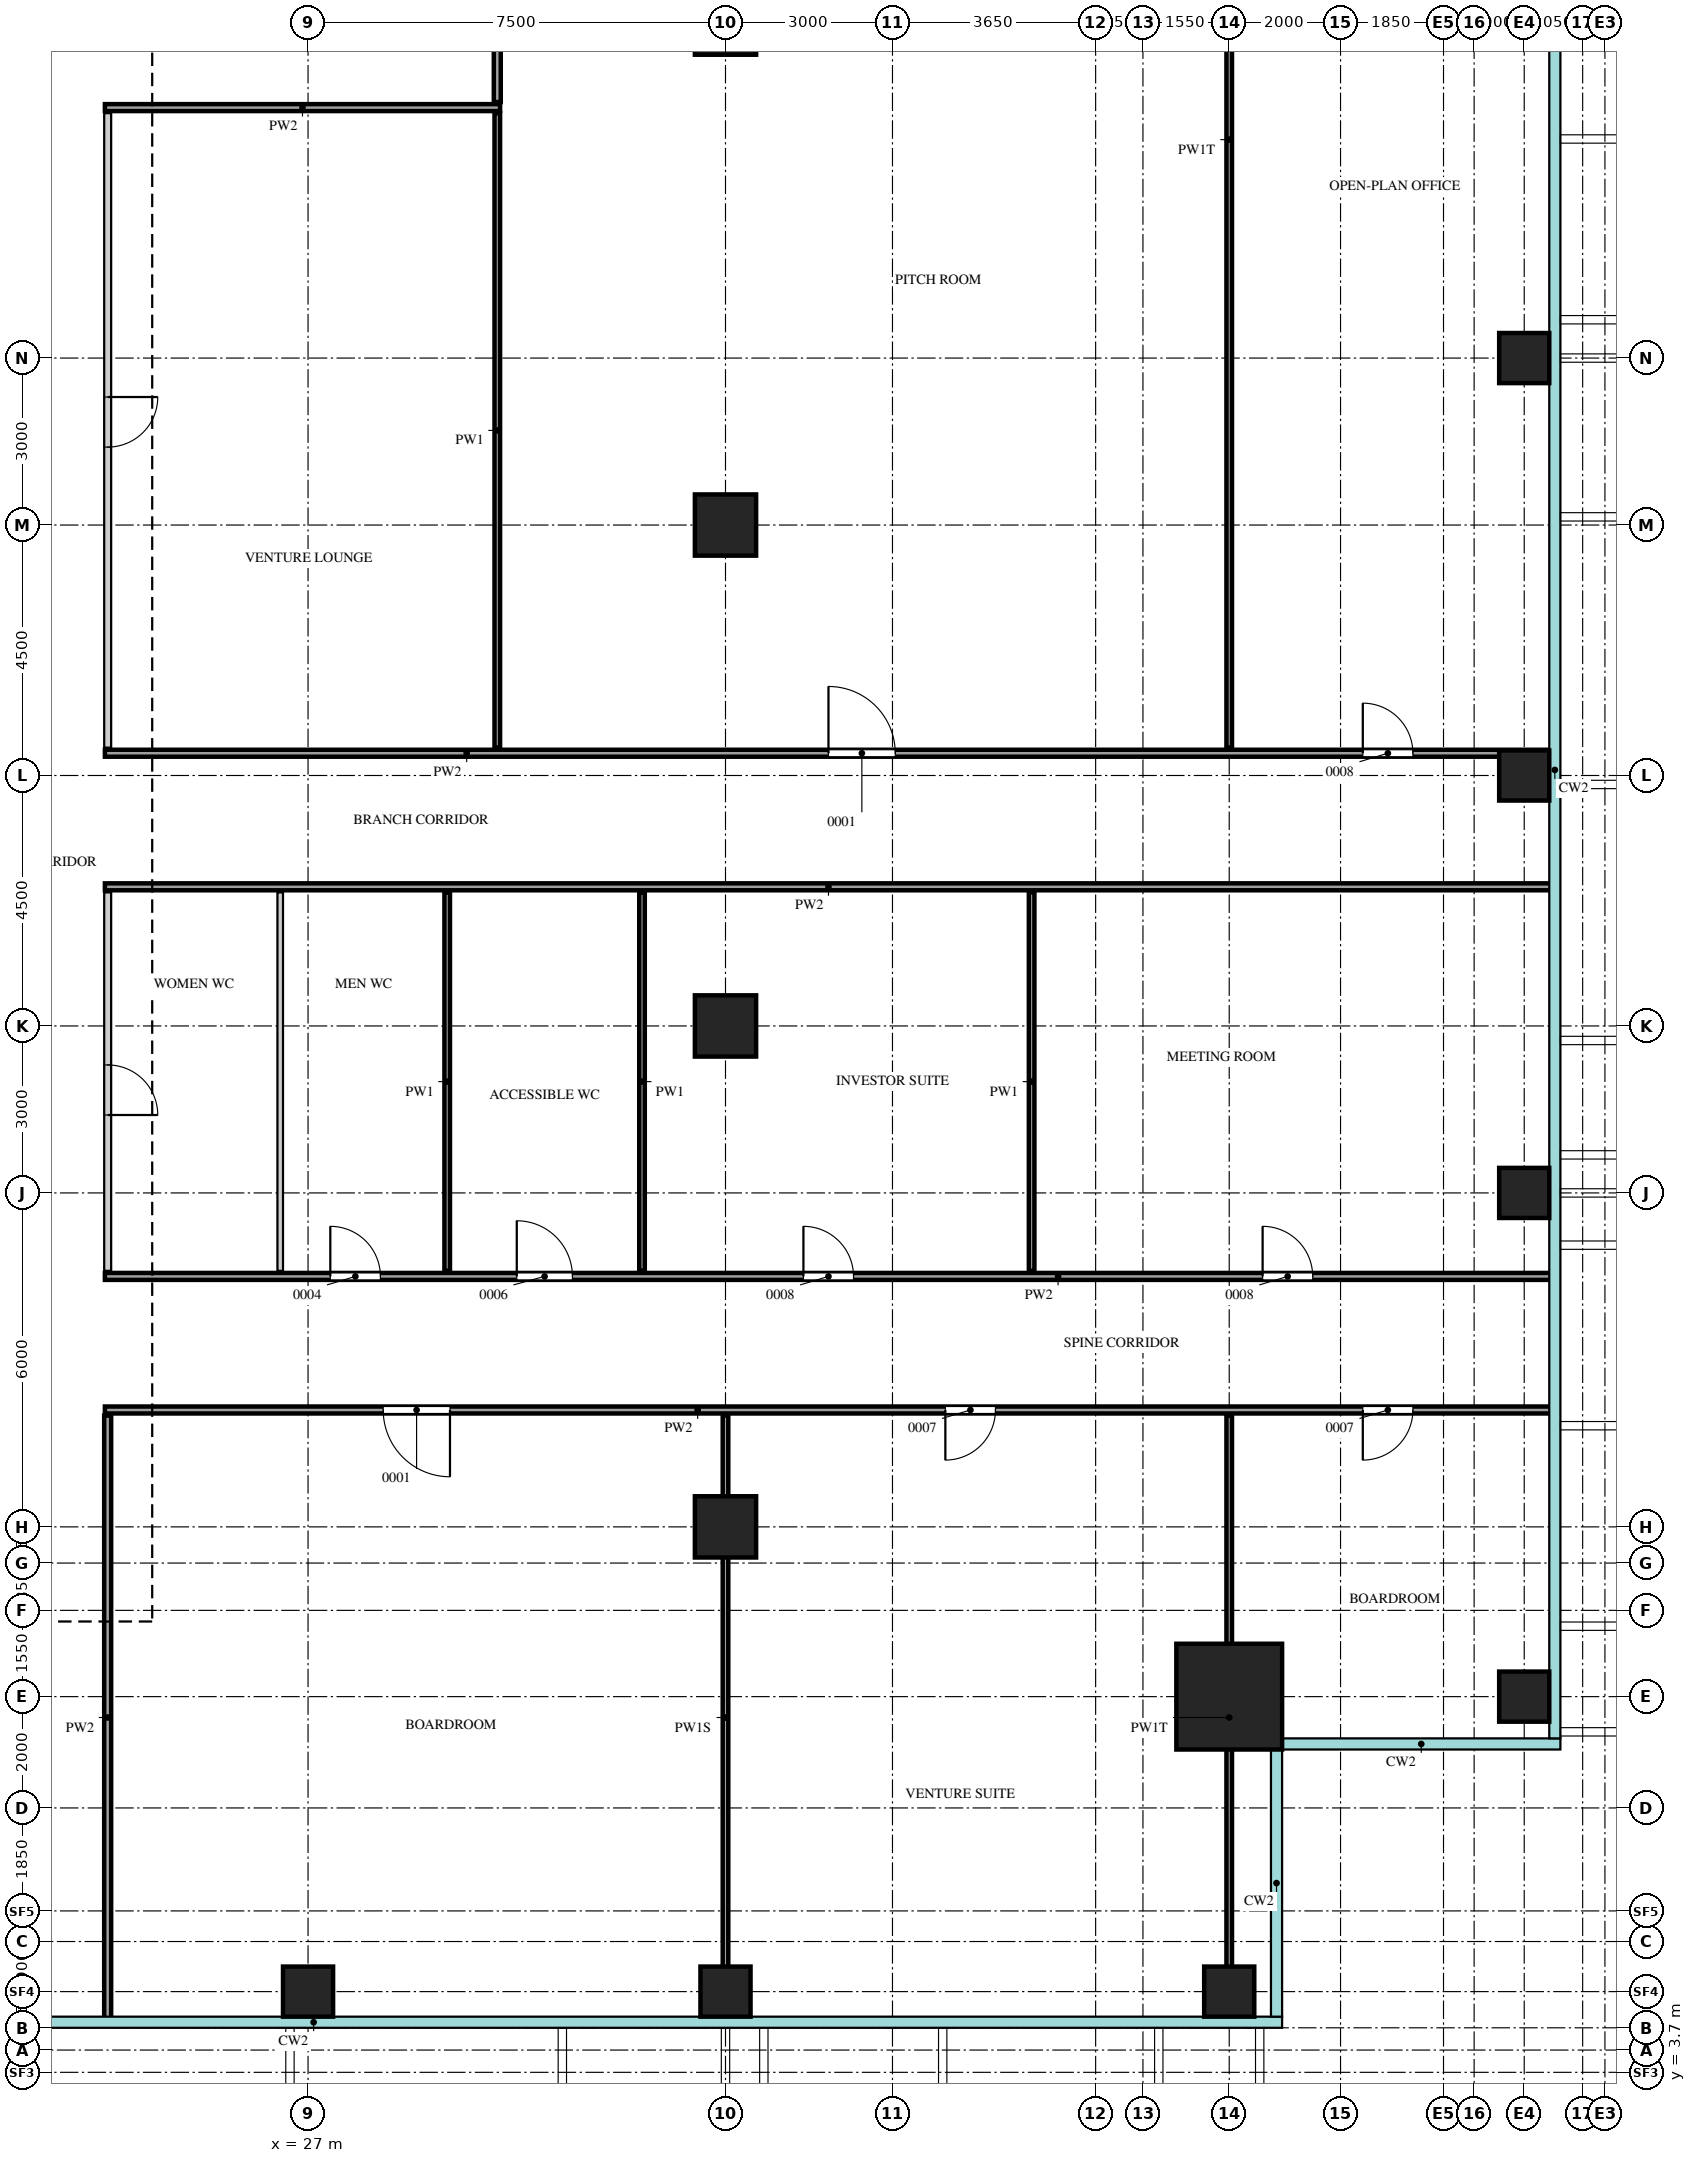
"""IFC4 building model, lengths in metres.
Left out: names, types, materials, properties, quantities, classifications, styles, units other than length and angle.
Written with IfcOpenShell. Run it as: python <this file> out.ifc"""

import sys

from ifc_helpers import new_model, si_unit, direction, frame, frame_2d, origin, origin_2d, place, context, subcontext, project, spatial, rectangle, extrude, source, transform, mapped, element, fill, save


model = new_model("IFC4")
c1 = context("Model", 3, precision=1e-05, world=origin(), true_north=direction((0.0, 1.0)))
c2 = subcontext(c1, "Body", "Model", "MODEL_VIEW")
j1 = project(units=[si_unit("LENGTHUNIT", "METRE"), si_unit("PLANEANGLEUNIT", "RADIAN")], contexts=[c1])
p1 = place(None, origin())
s1 = spatial("IfcSite", under=j1, at=p1, CompositionType="ELEMENT")
p2 = place(p1, origin())
s2 = spatial("IfcBuilding", under=s1, at=p2, CompositionType="ELEMENT")
p3 = place(p2, frame((0.0, 0.0, 234.2)))
s3 = spatial("IfcBuildingStorey", under=s2, at=p3, CompositionType="ELEMENT", Elevation=234.2)
m1 = source(origin(), c2, "Body", "SweptSolid", [
    extrude(rectangle(XDim=1.9, YDim=1.9, at=origin_2d()), origin(), (0.0, 0.0, 1.0), 4.0),
])
p4 = place(p3, frame((43.55, 10.45, 0.0), z_axis=(0.0, 0.0, 1.0), x_axis=(1.0, 0.0, 0.0)))
e1 = element("IfcColumn", 1, at=p4, inside=s3, PredefinedType="COLUMN", context=c2, shape_type="MappedRepresentation", body=[
    mapped(m1, transform((0.0, 0.0, 0.0))),
])
m2 = source(origin(), c2, "Body", "SweptSolid", [
    extrude(rectangle(XDim=0.9, YDim=0.9, at=origin_2d()), origin(), (0.0, 0.0, 1.0), 3.75),
])
for number, where, z_axis, x_axis in (
    (2, (27.0, 5.15, 0.0), (0.0, 0.0, 1.0), (1.0, 0.0, 0.0)),
    (3, (34.5, 5.15, 0.0), (0.0, 0.0, 1.0), (1.0, 0.0, 0.0)),
    (4, (43.55, 5.15, 0.0), (0.0, 0.0, 1.0), (1.0, 0.0, 0.0)),
    (5, (48.85, 10.45, 0.0), (0.0, 0.0, 1.0), (1.0, 0.0, 0.0)),
    (6, (48.85, 19.5, 0.0), (0.0, 0.0, 1.0), (1.0, 0.0, 0.0)),
    (7, (48.85, 27.0, 0.0), (0.0, 0.0, 1.0), (1.0, 0.0, 0.0)),
    (8, (48.85, 34.5, 0.0), (0.0, 0.0, 1.0), (1.0, 0.0, 0.0)),
):
    element("IfcColumn", number, at=place(p3, frame(where, z_axis=z_axis, x_axis=x_axis)), inside=s3, PredefinedType="COLUMN", context=c2, shape_type="MappedRepresentation", body=[
        mapped(m2, transform((0.0, 0.0, 0.0))),
    ])
m3 = source(origin(), c2, "Body", "SweptSolid", [
    extrude(rectangle(XDim=1.1, YDim=1.1, at=origin_2d()), origin(), (0.0, 0.0, 1.0), 3.75),
])
for number, where, z_axis, x_axis in (
    (9, (34.5, 13.5, 0.0), (0.0, 0.0, 1.0), (1.0, 0.0, 0.0)),
    (10, (34.5, 22.5, 0.0), (0.0, 0.0, 1.0), (1.0, 0.0, 0.0)),
    (11, (34.5, 31.5, 0.0), (0.0, 0.0, 1.0), (1.0, 0.0, 0.0)),
    (12, (34.5, 40.5, 0.0), (0.0, 0.0, 1.0), (1.0, 0.0, 0.0)),
):
    element("IfcColumn", number, at=place(p3, frame(where, z_axis=z_axis, x_axis=x_axis)), inside=s3, PredefinedType="COLUMN", context=c2, shape_type="MappedRepresentation", body=[
        mapped(m3, transform((0.0, 0.0, 0.0))),
    ])
m4 = source(origin(), c2, "Body", "SweptSolid", [
    extrude(rectangle(XDim=10.85, YDim=0.125, at=frame_2d((5.425, 0.0))), origin(), (0.0, 0.0, 1.0), 3.8),
])
p5 = place(p3, frame((23.4, 4.65, 0.0), z_axis=(0.0, 0.0, 1.0), x_axis=(0.0, 1.0, 0.0)))
e13 = element("IfcWall", 13, at=p5, inside=s3, PredefinedType="PARTITIONING", context=c2, shape_type="MappedRepresentation", body=[
    mapped(m4, transform((0.0, 0.0, 0.0))),
])
m5 = source(origin(), c2, "Body", "SweptSolid", [
    extrude(rectangle(XDim=10.85, YDim=0.1, at=frame_2d((5.425, 0.0))), origin(), (0.0, 0.0, 1.0), 3.35),
])
p6 = place(p3, frame((34.5, 4.65, 0.0), z_axis=(0.0, 0.0, 1.0), x_axis=(0.0, 1.0, 0.0)))
e14 = element("IfcWall", 14, at=p6, inside=s3, PredefinedType="PARTITIONING", context=c2, shape_type="MappedRepresentation", body=[
    mapped(m5, transform((0.0, 0.0, 0.0))),
])
m6 = source(origin(), c2, "Body", "SweptSolid", [
    extrude(rectangle(XDim=10.85, YDim=0.1, at=frame_2d((5.425, 0.0))), origin(), (0.0, 0.0, 1.0), 3.3),
])
p7 = place(p3, frame((43.55, 4.65, 0.0), z_axis=(0.0, 0.0, 1.0), x_axis=(0.0, 1.0, 0.0)))
e15 = element("IfcWall", 15, at=p7, inside=s3, PredefinedType="PARTITIONING", context=c2, shape_type="MappedRepresentation", body=[
    mapped(m6, transform((0.0, 0.0, 0.0))),
])
m7 = source(origin(), c2, "Body", "SweptSolid", [
    extrude(rectangle(XDim=26.0, YDim=0.125, at=frame_2d((13.0, 0.0))), origin(), (0.0, 0.0, 1.0), 3.8),
])
p8 = place(p3, frame((23.35, 15.6, 0.0), z_axis=(0.0, 0.0, 1.0), x_axis=(1.0, 0.0, 0.0)))
e16 = element("IfcWall", 16, at=p8, inside=s3, PredefinedType="PARTITIONING", context=c2, shape_type="MappedRepresentation", body=[
    mapped(m7, transform((0.0, 0.0, 0.0))),
])
m8 = source(origin(), c2, "Body", "SweptSolid", [
    extrude(rectangle(XDim=1.2, YDim=2.1, at=frame_2d((0.6, 1.05))), frame((0.0, 0.073, 0.0), z_axis=(0.0, -1.0, 0.0), x_axis=(1.0, 0.0, 0.0)), (0.0, 0.0, 1.0), 0.145),
])
p9 = place(p8, frame((5.0, 0.0, 0.0)))
e17 = element("IfcOpeningElement", 17, at=p9, cuts=e16, PredefinedType="OPENING", context=c2, shape_type="MappedRepresentation", body=[
    mapped(m8, transform((0.0, 0.0, 0.0))),
])
m9 = source(origin(), c2, "Body", "SweptSolid", [
    extrude(rectangle(XDim=0.9, YDim=2.1, at=frame_2d((0.45, 1.05))), frame((0.0, 0.073, 0.0), z_axis=(0.0, -1.0, 0.0), x_axis=(1.0, 0.0, 0.0)), (0.0, 0.0, 1.0), 0.145),
])
p10 = place(p8, frame((15.1, 0.0, 0.0)))
e18 = element("IfcOpeningElement", 18, at=p10, cuts=e16, PredefinedType="OPENING", context=c2, shape_type="MappedRepresentation", body=[
    mapped(m9, transform((0.0, 0.0, 0.0))),
])
p11 = place(p8, frame((22.6, 0.0, 0.0)))
e19 = element("IfcOpeningElement", 19, at=p11, cuts=e16, PredefinedType="OPENING", context=c2, shape_type="MappedRepresentation", body=[
    mapped(m9, transform((0.0, 0.0, 0.0))),
])
p12 = place(p3, frame((23.35, 18.0, 0.0), z_axis=(0.0, 0.0, 1.0), x_axis=(1.0, 0.0, 0.0)))
e20 = element("IfcWall", 20, at=p12, inside=s3, PredefinedType="PARTITIONING", context=c2, shape_type="MappedRepresentation", body=[
    mapped(m7, transform((0.0, 0.0, 0.0))),
])
p13 = place(p12, frame((4.05, 0.0, 0.0)))
e21 = element("IfcOpeningElement", 21, at=p13, cuts=e20, PredefinedType="OPENING", context=c2, shape_type="MappedRepresentation", body=[
    mapped(m9, transform((0.0, 0.0, 0.0))),
])
m10 = source(origin(), c2, "Body", "SweptSolid", [
    extrude(rectangle(XDim=1.0, YDim=2.1, at=frame_2d((0.5, 1.05))), frame((0.0, 0.073, 0.0), z_axis=(0.0, -1.0, 0.0), x_axis=(1.0, 0.0, 0.0)), (0.0, 0.0, 1.0), 0.145),
])
p14 = place(p12, frame((7.4, 0.0, 0.0)))
e22 = element("IfcOpeningElement", 22, at=p14, cuts=e20, PredefinedType="OPENING", context=c2, shape_type="MappedRepresentation", body=[
    mapped(m10, transform((0.0, 0.0, 0.0))),
])
p15 = place(p12, frame((12.55, 0.0, 0.0)))
e23 = element("IfcOpeningElement", 23, at=p15, cuts=e20, PredefinedType="OPENING", context=c2, shape_type="MappedRepresentation", body=[
    mapped(m9, transform((0.0, 0.0, 0.0))),
])
p16 = place(p12, frame((20.8, 0.0, 0.0)))
e24 = element("IfcOpeningElement", 24, at=p16, cuts=e20, PredefinedType="OPENING", context=c2, shape_type="MappedRepresentation", body=[
    mapped(m9, transform((0.0, 0.0, 0.0))),
])
m11 = source(origin(), c2, "Body", "SweptSolid", [
    extrude(rectangle(XDim=6.8, YDim=0.125, at=frame_2d((3.4, 0.0))), origin(), (0.0, 0.0, 1.0), 3.8),
])
p17 = place(p3, frame((23.4, 18.1, 0.0), z_axis=(0.0, 0.0, 1.0), x_axis=(0.0, 1.0, 0.0)))
e25 = element("IfcWall", 25, at=p17, inside=s3, PredefinedType="PARTITIONING", context=c2, shape_type="MappedRepresentation", body=[
    mapped(m11, transform((0.0, 0.0, 0.0))),
])
p18 = place(p17, frame((2.8, 0.0, 0.0)))
e26 = element("IfcOpeningElement", 26, at=p18, cuts=e25, PredefinedType="OPENING", context=c2, shape_type="MappedRepresentation", body=[
    mapped(m9, transform((0.0, 0.0, 0.0))),
])
m12 = source(origin(), c2, "Body", "SweptSolid", [
    extrude(rectangle(XDim=6.8, YDim=0.1, at=frame_2d((3.4, 0.0))), origin(), (0.0, 0.0, 1.0), 3.8),
])
for number, where, z_axis, x_axis in (
    (27, (26.5, 18.1, 0.0), (0.0, 0.0, 1.0), (0.0, 1.0, 0.0)),
    (28, (29.5, 18.1, 0.0), (0.0, 0.0, 1.0), (0.0, 1.0, 0.0)),
    (29, (33.0, 18.1, 0.0), (0.0, 0.0, 1.0), (0.0, 1.0, 0.0)),
    (30, (40.0, 18.1, 0.0), (0.0, 0.0, 1.0), (0.0, 1.0, 0.0)),
):
    element("IfcWall", number, at=place(p3, frame(where, z_axis=z_axis, x_axis=x_axis)), inside=s3, PredefinedType="PARTITIONING", context=c2, shape_type="MappedRepresentation", body=[
        mapped(m12, transform((0.0, 0.0, 0.0))),
    ])
p19 = place(p3, frame((23.35, 25.0, 0.0), z_axis=(0.0, 0.0, 1.0), x_axis=(1.0, 0.0, 0.0)))
e31 = element("IfcWall", 31, at=p19, inside=s3, PredefinedType="PARTITIONING", context=c2, shape_type="MappedRepresentation", body=[
    mapped(m7, transform((0.0, 0.0, 0.0))),
])
p20 = place(p3, frame((23.35, 27.4, 0.0), z_axis=(0.0, 0.0, 1.0), x_axis=(1.0, 0.0, 0.0)))
e32 = element("IfcWall", 32, at=p20, inside=s3, PredefinedType="PARTITIONING", context=c2, shape_type="MappedRepresentation", body=[
    mapped(m7, transform((0.0, 0.0, 0.0))),
])
p21 = place(p20, frame((13.0, 0.0, 0.0)))
e33 = element("IfcOpeningElement", 33, at=p21, cuts=e32, PredefinedType="OPENING", context=c2, shape_type="MappedRepresentation", body=[
    mapped(m8, transform((0.0, 0.0, 0.0))),
])
p22 = place(p20, frame((22.6, 0.0, 0.0)))
e34 = element("IfcOpeningElement", 34, at=p22, cuts=e32, PredefinedType="OPENING", context=c2, shape_type="MappedRepresentation", body=[
    mapped(m9, transform((0.0, 0.0, 0.0))),
])
m13 = source(origin(), c2, "Body", "SweptSolid", [
    extrude(rectangle(XDim=11.4, YDim=0.125, at=frame_2d((5.7, 0.0))), origin(), (0.0, 0.0, 1.0), 3.8),
])
p23 = place(p3, frame((23.4, 27.5, 0.0), z_axis=(0.0, 0.0, 1.0), x_axis=(0.0, 1.0, 0.0)))
e35 = element("IfcWall", 35, at=p23, inside=s3, PredefinedType="PARTITIONING", context=c2, shape_type="MappedRepresentation", body=[
    mapped(m13, transform((0.0, 0.0, 0.0))),
])
p24 = place(p23, frame((5.4, 0.0, 0.0)))
e36 = element("IfcOpeningElement", 36, at=p24, cuts=e35, PredefinedType="OPENING", context=c2, shape_type="MappedRepresentation", body=[
    mapped(m9, transform((0.0, 0.0, 0.0))),
])
m14 = source(origin(), c2, "Body", "SweptSolid", [
    extrude(rectangle(XDim=11.4, YDim=0.1, at=frame_2d((5.7, 0.0))), origin(), (0.0, 0.0, 1.0), 3.8),
])
p25 = place(p3, frame((30.4, 27.5, 0.0), z_axis=(0.0, 0.0, 1.0), x_axis=(0.0, 1.0, 0.0)))
e37 = element("IfcWall", 37, at=p25, inside=s3, PredefinedType="PARTITIONING", context=c2, shape_type="MappedRepresentation", body=[
    mapped(m14, transform((0.0, 0.0, 0.0))),
])
m15 = source(origin(), c2, "Body", "SweptSolid", [
    extrude(rectangle(XDim=21.85, YDim=0.1, at=frame_2d((10.925, 0.0))), origin(), (0.0, 0.0, 1.0), 3.3),
])
p26 = place(p3, frame((43.55, 27.5, 0.0), z_axis=(0.0, 0.0, 1.0), x_axis=(0.0, 1.0, 0.0)))
e38 = element("IfcWall", 38, at=p26, inside=s3, PredefinedType="PARTITIONING", context=c2, shape_type="MappedRepresentation", body=[
    mapped(m15, transform((0.0, 0.0, 0.0))),
])
m16 = source(origin(), c2, "Body", "SweptSolid", [
    extrude(rectangle(XDim=7.1, YDim=0.125, at=frame_2d((3.55, 0.0))), origin(), (0.0, 0.0, 1.0), 3.8),
])
p27 = place(p3, frame((23.35, 39.0, 0.0), z_axis=(0.0, 0.0, 1.0), x_axis=(1.0, 0.0, 0.0)))
e39 = element("IfcWall", 39, at=p27, inside=s3, PredefinedType="PARTITIONING", context=c2, shape_type="MappedRepresentation", body=[
    mapped(m16, transform((0.0, 0.0, 0.0))),
])
m17 = source(origin(), c2, "Body", "SweptSolid", [
    extrude(rectangle(XDim=6.6, YDim=0.125, at=frame_2d((3.3, 0.0))), origin(), (0.0, 0.0, 1.0), 3.8),
])
p28 = place(p3, frame((30.4, 39.1, 0.0), z_axis=(0.0, 0.0, 1.0), x_axis=(0.0, 1.0, 0.0)))
e40 = element("IfcWall", 40, at=p28, inside=s3, PredefinedType="PARTITIONING", context=c2, shape_type="MappedRepresentation", body=[
    mapped(m17, transform((0.0, 0.0, 0.0))),
])
m18 = source(origin(), c2, "Body", "SweptSolid", [
    extrude(rectangle(XDim=1.2, YDim=2.1, at=frame_2d((0.6, 1.05))), frame((0.0, 0.025, 0.0), z_axis=(0.0, -1.0, 0.0), x_axis=(1.0, 0.0, 0.0)), (0.0, 0.0, 1.0), 0.05),
])
p29 = place(p9, origin())
e41 = element("IfcDoor", 41, at=p29, inside=s3, OperationType="SINGLE_SWING_RIGHT", PredefinedType="DOOR", context=c2, shape_type="MappedRepresentation", body=[
    mapped(m18, transform((0.0, 0.0, 0.0))),
])
fill(e17, e41)
m19 = source(origin(), c2, "Body", "SweptSolid", [
    extrude(rectangle(XDim=0.9, YDim=2.1, at=frame_2d((0.45, 1.05))), frame((0.0, 0.025, 0.0), z_axis=(0.0, -1.0, 0.0), x_axis=(1.0, 0.0, 0.0)), (0.0, 0.0, 1.0), 0.05),
])
p30 = place(p10, origin())
e42 = element("IfcDoor", 42, at=p30, inside=s3, OperationType="SINGLE_SWING_LEFT", PredefinedType="DOOR", context=c2, shape_type="MappedRepresentation", body=[
    mapped(m19, transform((0.0, 0.0, 0.0))),
])
fill(e18, e42)
p31 = place(p11, origin())
e43 = element("IfcDoor", 43, at=p31, inside=s3, OperationType="SINGLE_SWING_LEFT", PredefinedType="DOOR", context=c2, shape_type="MappedRepresentation", body=[
    mapped(m19, transform((0.0, 0.0, 0.0))),
])
fill(e19, e43)
p32 = place(p18, origin())
e44 = element("IfcDoor", 44, at=p32, inside=s3, OperationType="SINGLE_SWING_LEFT", PredefinedType="DOOR", context=c2, shape_type="MappedRepresentation", body=[
    mapped(m19, transform((0.0, 0.0, 0.0))),
])
fill(e26, e44)
p33 = place(p13, origin())
e45 = element("IfcDoor", 45, at=p33, inside=s3, OperationType="SINGLE_SWING_RIGHT", PredefinedType="DOOR", context=c2, shape_type="MappedRepresentation", body=[
    mapped(m19, transform((0.0, 0.0, 0.0))),
])
fill(e21, e45)
m20 = source(origin(), c2, "Body", "SweptSolid", [
    extrude(rectangle(XDim=1.0, YDim=2.1, at=frame_2d((0.5, 1.05))), frame((0.0, 0.025, 0.0), z_axis=(0.0, -1.0, 0.0), x_axis=(1.0, 0.0, 0.0)), (0.0, 0.0, 1.0), 0.05),
])
p34 = place(p14, origin())
e46 = element("IfcDoor", 46, at=p34, inside=s3, OperationType="SINGLE_SWING_RIGHT", PredefinedType="DOOR", context=c2, shape_type="MappedRepresentation", body=[
    mapped(m20, transform((0.0, 0.0, 0.0))),
])
fill(e22, e46)
p35 = place(p15, origin())
e47 = element("IfcDoor", 47, at=p35, inside=s3, OperationType="SINGLE_SWING_RIGHT", PredefinedType="DOOR", context=c2, shape_type="MappedRepresentation", body=[
    mapped(m19, transform((0.0, 0.0, 0.0))),
])
fill(e23, e47)
p36 = place(p16, origin())
e48 = element("IfcDoor", 48, at=p36, inside=s3, OperationType="SINGLE_SWING_RIGHT", PredefinedType="DOOR", context=c2, shape_type="MappedRepresentation", body=[
    mapped(m19, transform((0.0, 0.0, 0.0))),
])
fill(e24, e48)
p37 = place(p24, origin())
e49 = element("IfcDoor", 49, at=p37, inside=s3, OperationType="SINGLE_SWING_RIGHT", PredefinedType="DOOR", context=c2, shape_type="MappedRepresentation", body=[
    mapped(m19, transform((0.0, 0.0, 0.0))),
])
fill(e36, e49)
p38 = place(p21, origin())
e50 = element("IfcDoor", 50, at=p38, inside=s3, OperationType="SINGLE_SWING_RIGHT", PredefinedType="DOOR", context=c2, shape_type="MappedRepresentation", body=[
    mapped(m18, transform((0.0, 0.0, 0.0))),
])
fill(e33, e50)
p39 = place(p22, origin())
e51 = element("IfcDoor", 51, at=p39, inside=s3, OperationType="SINGLE_SWING_RIGHT", PredefinedType="DOOR", context=c2, shape_type="MappedRepresentation", body=[
    mapped(m19, transform((0.0, 0.0, 0.0))),
])
fill(e34, e51)
save(model, sys.argv[1])
